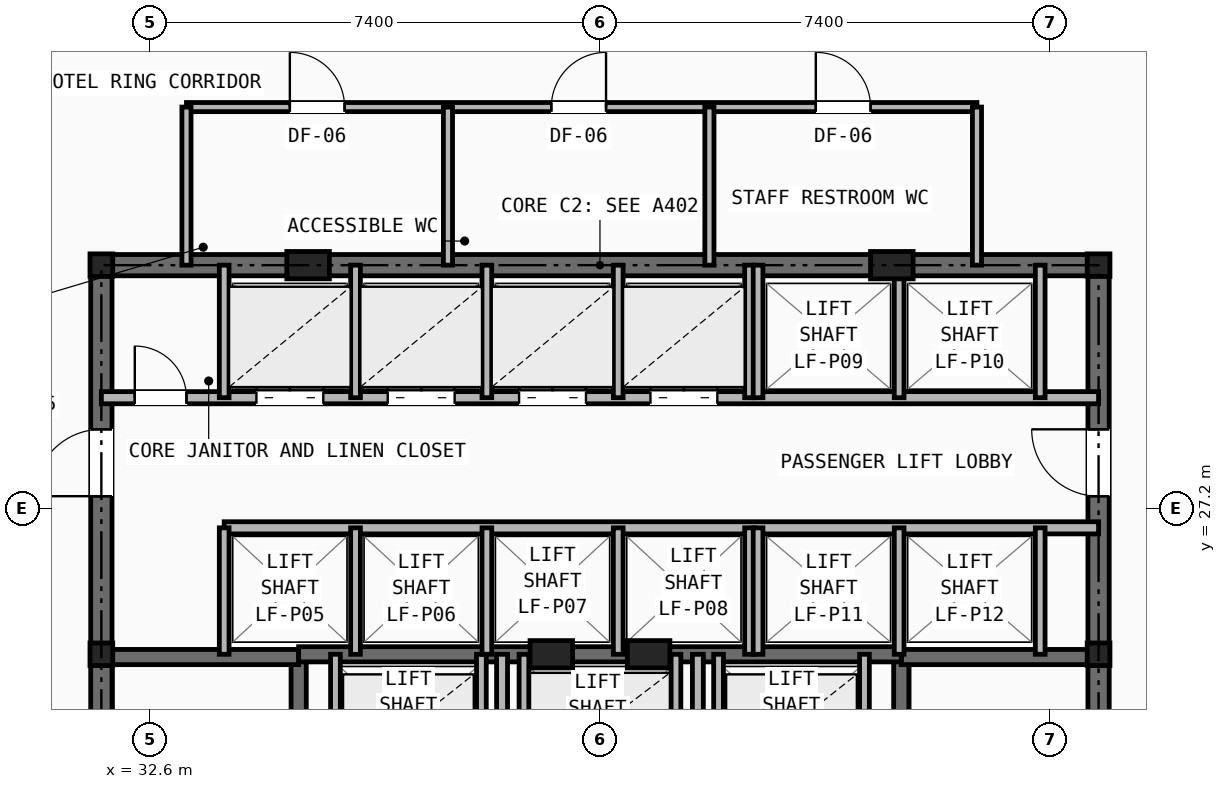
"""IFC4 building model, lengths in metres.
Left out: names, types, materials, properties, quantities, classifications, styles, units other than length and angle.
Written with IfcOpenShell. Run it as: python <this file> out.ifc"""

import sys

from ifc_helpers import new_model, si_unit, direction, frame, frame_2d, origin, origin_2d, place, context, subcontext, project, spatial, rectangle, i_section, extrude, element, fill, save


model = new_model("IFC4")
c1 = context("Model", 3, precision=1e-05, world=origin(), true_north=direction((0.0, 1.0)))
c2 = subcontext(c1, "Body", "Model", "MODEL_VIEW")
j1 = project(units=[si_unit("LENGTHUNIT", "METRE"), si_unit("PLANEANGLEUNIT", "RADIAN")], contexts=[c1])
p1 = place(None, origin())
s1 = spatial("IfcSite", under=j1, at=p1, CompositionType="ELEMENT")
p2 = place(p1, origin())
s2 = spatial("IfcBuilding", under=s1, at=p2, CompositionType="ELEMENT")
p3 = place(p2, frame((0.0, 0.0, 33.6)))
s3 = spatial("IfcBuildingStorey", under=s2, at=p3, CompositionType="ELEMENT", Elevation=33.6)
for number, where, z_axis, x_axis in (
    (1, (31.8, 24.8, 0.0), (0.0, 0.0, 1.0), (1.0, 0.0, 0.0)),
    (2, (48.2, 24.8, 0.0), (0.0, 0.0, 1.0), (1.0, 0.0, 0.0)),
    (3, (31.8, 31.2, 0.0), (0.0, 0.0, 1.0), (1.0, 0.0, 0.0)),
    (4, (48.2, 31.2, 0.0), (0.0, 0.0, 1.0), (1.0, 0.0, 0.0)),
):
    element("IfcColumn", number, at=place(p3, frame(where, z_axis=z_axis, x_axis=x_axis)), inside=s3, PredefinedType="COLUMN", context=c2, shape_type="SweptSolid", body=[
        extrude(i_section(OverallWidth=0.374, OverallDepth=0.372, WebThickness=0.016, FlangeThickness=0.026, at=origin_2d()), origin(), (0.0, 0.0, 1.0), 3.2),
    ])
for number, where, z_axis, x_axis in (
    (5, (35.2, 31.2, 0.0), (0.0, 0.0, 1.0), (1.0, 0.0, 0.0)),
    (6, (44.8, 31.2, 0.0), (0.0, 0.0, 1.0), (1.0, 0.0, 0.0)),
    (7, (39.2, 24.8, 0.0), (0.0, 0.0, 1.0), (1.0, 0.0, 0.0)),
    (8, (40.8, 24.8, 0.0), (0.0, 0.0, 1.0), (1.0, 0.0, 0.0)),
):
    element("IfcColumn", number, at=place(p3, frame(where, z_axis=z_axis, x_axis=x_axis)), inside=s3, PredefinedType="PILASTER", context=c2, shape_type="SweptSolid", body=[
        extrude(rectangle(XDim=0.7, YDim=0.45, at=origin_2d()), origin(), (0.0, 0.0, 1.0), 3.2),
    ])
p4 = place(p3, frame((31.8, 31.2, 0.0), z_axis=(0.0, 0.0, 1.0), x_axis=(1.0, 0.0, 0.0)))
e9 = element("IfcWall", 9, at=p4, inside=s3, PredefinedType="SHEAR", context=c2, shape_type="SweptSolid", body=[
    extrude(rectangle(XDim=16.4, YDim=0.35, at=frame_2d((8.2, 0.0))), origin(), (0.0, 0.0, 1.0), 2.98),
])
p5 = place(p3, frame((31.8, 16.4, 0.0), z_axis=(0.0, 0.0, 1.0), x_axis=(0.0, 1.0, 0.0)))
e10 = element("IfcWall", 10, at=p5, inside=s3, PredefinedType="SHEAR", context=c2, shape_type="SweptSolid", body=[
    extrude(rectangle(XDim=14.8, YDim=0.35, at=frame_2d((7.4, 0.0))), origin(), (0.0, 0.0, 1.0), 2.98),
])
p6 = place(p5, frame((11.0, 0.0, 0.0)))
e11 = element("IfcOpeningElement", 11, at=p6, cuts=e10, PredefinedType="OPENING", context=c2, shape_type="SweptSolid", body=[
    extrude(rectangle(XDim=1.1, YDim=2.15, at=frame_2d((0.55, 1.075))), frame((0.0, 0.185, 0.0), z_axis=(0.0, -1.0, 0.0), x_axis=(1.0, 0.0, 0.0)), (0.0, 0.0, 1.0), 0.37),
])
p7 = place(p3, frame((48.2, 16.4, 0.0), z_axis=(0.0, 0.0, 1.0), x_axis=(0.0, 1.0, 0.0)))
e12 = element("IfcWall", 12, at=p7, inside=s3, PredefinedType="SHEAR", context=c2, shape_type="SweptSolid", body=[
    extrude(rectangle(XDim=14.8, YDim=0.35, at=frame_2d((7.4, 0.0))), origin(), (0.0, 0.0, 1.0), 2.98),
])
p8 = place(p7, frame((11.0, 0.0, 0.0)))
e13 = element("IfcOpeningElement", 13, at=p8, cuts=e12, PredefinedType="OPENING", context=c2, shape_type="SweptSolid", body=[
    extrude(rectangle(XDim=1.1, YDim=2.15, at=frame_2d((0.55, 1.075))), frame((0.0, 0.185, 0.0), z_axis=(0.0, -1.0, 0.0), x_axis=(1.0, 0.0, 0.0)), (0.0, 0.0, 1.0), 0.37),
])
p9 = place(p3, frame((35.045, 16.4, 0.0), z_axis=(0.0, 0.0, 1.0), x_axis=(0.0, 1.0, 0.0)))
e14 = element("IfcWall", 14, at=p9, inside=s3, PredefinedType="SHEAR", context=c2, shape_type="SweptSolid", body=[
    extrude(rectangle(XDim=8.4, YDim=0.25, at=frame_2d((4.2, 0.0))), origin(), (0.0, 0.0, 1.0), 2.98),
])
p10 = place(p9, frame((0.45, 0.0, 0.0)))
e15 = element("IfcOpeningElement", 15, at=p10, cuts=e14, PredefinedType="OPENING", context=c2, shape_type="SweptSolid", body=[
    extrude(rectangle(XDim=0.95, YDim=2.1, at=frame_2d((0.475, 1.05))), frame((0.0, 0.135, 0.0), z_axis=(0.0, -1.0, 0.0), x_axis=(1.0, 0.0, 0.0)), (0.0, 0.0, 1.0), 0.27),
])
p11 = place(p3, frame((31.8, 24.755, 0.0), z_axis=(0.0, 0.0, 1.0), x_axis=(1.0, 0.0, 0.0)))
e16 = element("IfcWall", 16, at=p11, inside=s3, PredefinedType="SHEAR", context=c2, shape_type="SweptSolid", body=[
    extrude(rectangle(XDim=3.245, YDim=0.25, at=frame_2d((1.623, 0.0))), origin(), (0.0, 0.0, 1.0), 2.98),
])
p12 = place(p3, frame((44.955, 16.4, 0.0), z_axis=(0.0, 0.0, 1.0), x_axis=(0.0, 1.0, 0.0)))
e17 = element("IfcWall", 17, at=p12, inside=s3, PredefinedType="SHEAR", context=c2, shape_type="SweptSolid", body=[
    extrude(rectangle(XDim=8.4, YDim=0.25, at=frame_2d((4.2, 0.0))), origin(), (0.0, 0.0, 1.0), 2.98),
])
p13 = place(p12, frame((0.45, 0.0, 0.0)))
e18 = element("IfcOpeningElement", 18, at=p13, cuts=e17, PredefinedType="OPENING", context=c2, shape_type="SweptSolid", body=[
    extrude(rectangle(XDim=0.95, YDim=2.1, at=frame_2d((0.475, 1.05))), frame((0.0, 0.135, 0.0), z_axis=(0.0, -1.0, 0.0), x_axis=(1.0, 0.0, 0.0)), (0.0, 0.0, 1.0), 0.27),
])
p14 = place(p3, frame((44.955, 24.755, 0.0), z_axis=(0.0, 0.0, 1.0), x_axis=(1.0, 0.0, 0.0)))
e19 = element("IfcWall", 19, at=p14, inside=s3, PredefinedType="SHEAR", context=c2, shape_type="SweptSolid", body=[
    extrude(rectangle(XDim=3.245, YDim=0.25, at=frame_2d((1.623, 0.0))), origin(), (0.0, 0.0, 1.0), 2.98),
])
p15 = place(p3, frame((35.045, 24.8, 0.0), z_axis=(0.0, 0.0, 1.0), x_axis=(1.0, 0.0, 0.0)))
e20 = element("IfcWall", 20, at=p15, inside=s3, PredefinedType="SHEAR", context=c2, shape_type="SweptSolid", body=[
    extrude(rectangle(XDim=9.91, YDim=0.25, at=frame_2d((4.955, 0.0))), origin(), (0.0, 0.0, 1.0), 2.98),
])
p16 = place(p3, frame((38.39, 16.4, 0.0), z_axis=(0.0, 0.0, 1.0), x_axis=(0.0, 1.0, 0.0)))
e21 = element("IfcWall", 21, at=p16, inside=s3, PredefinedType="PARTITIONING", context=c2, shape_type="SweptSolid", body=[
    extrude(rectangle(XDim=8.4, YDim=0.18, at=frame_2d((4.2, 0.0))), origin(), (0.0, 0.0, 1.0), 2.431),
])
p17 = place(p16, frame((3.8, 0.0, 0.0)))
e22 = element("IfcOpeningElement", 22, at=p17, cuts=e21, PredefinedType="OPENING", context=c2, shape_type="SweptSolid", body=[
    extrude(rectangle(XDim=0.95, YDim=2.1, at=frame_2d((0.475, 1.05))), frame((0.0, 0.1, 0.0), z_axis=(0.0, -1.0, 0.0), x_axis=(1.0, 0.0, 0.0)), (0.0, 0.0, 1.0), 0.2),
])
p18 = place(p3, frame((41.61, 16.4, 0.0), z_axis=(0.0, 0.0, 1.0), x_axis=(0.0, 1.0, 0.0)))
e23 = element("IfcWall", 23, at=p18, inside=s3, PredefinedType="PARTITIONING", context=c2, shape_type="SweptSolid", body=[
    extrude(rectangle(XDim=8.4, YDim=0.18, at=frame_2d((4.2, 0.0))), origin(), (0.0, 0.0, 1.0), 2.431),
])
for number, where, z_axis, x_axis in (
    (24, (35.65, 22.48, 0.0), (0.0, 0.0, 1.0), (0.0, 1.0, 0.0)),
    (25, (38.05, 22.48, 0.0), (0.0, 0.0, 1.0), (0.0, 1.0, 0.0)),
    (26, (41.95, 22.48, 0.0), (0.0, 0.0, 1.0), (0.0, 1.0, 0.0)),
    (27, (44.35, 22.48, 0.0), (0.0, 0.0, 1.0), (0.0, 1.0, 0.0)),
    (28, (38.75, 22.48, 0.0), (0.0, 0.0, 1.0), (0.0, 1.0, 0.0)),
    (29, (41.25, 22.48, 0.0), (0.0, 0.0, 1.0), (0.0, 1.0, 0.0)),
):
    element("IfcWall", number, at=place(p3, frame(where, z_axis=z_axis, x_axis=x_axis)), inside=s3, PredefinedType="SOLIDWALL", context=c2, shape_type="SweptSolid", body=[
        extrude(rectangle(XDim=2.32, YDim=0.16, at=frame_2d((1.16, 0.0))), origin(), (0.0, 0.0, 1.0), 2.98),
    ])
p19 = place(p3, frame((31.8, 29.02, 0.0), z_axis=(0.0, 0.0, 1.0), x_axis=(1.0, 0.0, 0.0)))
e30 = element("IfcWall", 30, at=p19, inside=s3, PredefinedType="SOLIDWALL", context=c2, shape_type="SweptSolid", body=[
    extrude(rectangle(XDim=16.4, YDim=0.2, at=frame_2d((8.2, 0.0))), origin(), (0.0, 0.0, 1.0), 2.431),
])
p20 = place(p19, frame((0.55, 0.0, 0.0)))
e31 = element("IfcOpeningElement", 31, at=p20, cuts=e30, PredefinedType="OPENING", context=c2, shape_type="SweptSolid", body=[
    extrude(rectangle(XDim=0.85, YDim=2.05, at=frame_2d((0.425, 1.025))), frame((0.0, 0.11, 0.0), z_axis=(0.0, -1.0, 0.0), x_axis=(1.0, 0.0, 0.0)), (0.0, 0.0, 1.0), 0.22),
])
p21 = place(p19, frame((2.55, 0.0, 0.0)))
e32 = element("IfcOpeningElement", 32, at=p21, cuts=e30, PredefinedType="OPENING", context=c2, shape_type="SweptSolid", body=[
    extrude(rectangle(XDim=1.1, YDim=2.15, at=frame_2d((0.55, 1.075))), frame((0.0, 0.11, 0.0), z_axis=(0.0, -1.0, 0.0), x_axis=(1.0, 0.0, 0.0)), (0.0, 0.0, 1.0), 0.22),
])
p22 = place(p19, frame((4.71, 0.0, 0.0)))
e33 = element("IfcOpeningElement", 33, at=p22, cuts=e30, PredefinedType="OPENING", context=c2, shape_type="SweptSolid", body=[
    extrude(rectangle(XDim=1.1, YDim=2.15, at=frame_2d((0.55, 1.075))), frame((0.0, 0.11, 0.0), z_axis=(0.0, -1.0, 0.0), x_axis=(1.0, 0.0, 0.0)), (0.0, 0.0, 1.0), 0.22),
])
p23 = place(p19, frame((6.87, 0.0, 0.0)))
e34 = element("IfcOpeningElement", 34, at=p23, cuts=e30, PredefinedType="OPENING", context=c2, shape_type="SweptSolid", body=[
    extrude(rectangle(XDim=1.1, YDim=2.15, at=frame_2d((0.55, 1.075))), frame((0.0, 0.11, 0.0), z_axis=(0.0, -1.0, 0.0), x_axis=(1.0, 0.0, 0.0)), (0.0, 0.0, 1.0), 0.22),
])
p24 = place(p19, frame((9.03, 0.0, 0.0)))
e35 = element("IfcOpeningElement", 35, at=p24, cuts=e30, PredefinedType="OPENING", context=c2, shape_type="SweptSolid", body=[
    extrude(rectangle(XDim=1.1, YDim=2.15, at=frame_2d((0.55, 1.075))), frame((0.0, 0.11, 0.0), z_axis=(0.0, -1.0, 0.0), x_axis=(1.0, 0.0, 0.0)), (0.0, 0.0, 1.0), 0.22),
])
p25 = place(p3, frame((33.82, 26.88, 0.0), z_axis=(0.0, 0.0, 1.0), x_axis=(1.0, 0.0, 0.0)))
e36 = element("IfcWall", 36, at=p25, inside=s3, PredefinedType="SOLIDWALL", context=c2, shape_type="SweptSolid", body=[
    extrude(rectangle(XDim=14.38, YDim=0.2, at=frame_2d((7.19, 0.0))), origin(), (0.0, 0.0, 1.0), 2.431),
])
p26 = place(p3, frame((33.82, 29.02, 0.0), z_axis=(0.0, 0.0, 1.0), x_axis=(0.0, 1.0, 0.0)))
e37 = element("IfcWall", 37, at=p26, inside=s3, PredefinedType="SOLIDWALL", context=c2, shape_type="SweptSolid", body=[
    extrude(rectangle(XDim=2.18, YDim=0.16, at=frame_2d((1.09, 0.0))), origin(), (0.0, 0.0, 1.0), 2.431),
])
p27 = place(p3, frame((33.82, 24.8, 0.0), z_axis=(0.0, 0.0, 1.0), x_axis=(0.0, 1.0, 0.0)))
e38 = element("IfcWall", 38, at=p27, inside=s3, PredefinedType="SOLIDWALL", context=c2, shape_type="SweptSolid", body=[
    extrude(rectangle(XDim=2.08, YDim=0.16, at=frame_2d((1.04, 0.0))), origin(), (0.0, 0.0, 1.0), 2.98),
])
for number, where, z_axis, x_axis in (
    (39, (35.98, 29.02, 0.0), (0.0, 0.0, 1.0), (0.0, 1.0, 0.0)),
    (40, (38.14, 29.02, 0.0), (0.0, 0.0, 1.0), (0.0, 1.0, 0.0)),
    (41, (40.3, 29.02, 0.0), (0.0, 0.0, 1.0), (0.0, 1.0, 0.0)),
    (42, (42.46, 29.02, 0.0), (0.0, 0.0, 1.0), (0.0, 1.0, 0.0)),
):
    element("IfcWall", number, at=place(p3, frame(where, z_axis=z_axis, x_axis=x_axis)), inside=s3, PredefinedType="SOLIDWALL", context=c2, shape_type="SweptSolid", body=[
        extrude(rectangle(XDim=2.18, YDim=0.16, at=frame_2d((1.09, 0.0))), origin(), (0.0, 0.0, 1.0), 2.431),
    ])
for number, where, z_axis, x_axis in (
    (43, (35.98, 24.8, 0.0), (0.0, 0.0, 1.0), (0.0, 1.0, 0.0)),
    (44, (38.14, 24.8, 0.0), (0.0, 0.0, 1.0), (0.0, 1.0, 0.0)),
    (45, (40.3, 24.8, 0.0), (0.0, 0.0, 1.0), (0.0, 1.0, 0.0)),
    (46, (42.46, 24.8, 0.0), (0.0, 0.0, 1.0), (0.0, 1.0, 0.0)),
):
    element("IfcWall", number, at=place(p3, frame(where, z_axis=z_axis, x_axis=x_axis)), inside=s3, PredefinedType="SOLIDWALL", context=c2, shape_type="SweptSolid", body=[
        extrude(rectangle(XDim=2.08, YDim=0.16, at=frame_2d((1.04, 0.0))), origin(), (0.0, 0.0, 1.0), 2.98),
    ])
for number, where, z_axis, x_axis in (
    (47, (42.6, 29.02, 0.0), (0.0, 0.0, 1.0), (0.0, 1.0, 0.0)),
    (48, (44.92, 29.02, 0.0), (0.0, 0.0, 1.0), (0.0, 1.0, 0.0)),
    (49, (47.24, 29.02, 0.0), (0.0, 0.0, 1.0), (0.0, 1.0, 0.0)),
):
    element("IfcWall", number, at=place(p3, frame(where, z_axis=z_axis, x_axis=x_axis)), inside=s3, PredefinedType="SOLIDWALL", context=c2, shape_type="SweptSolid", body=[
        extrude(rectangle(XDim=2.18, YDim=0.16, at=frame_2d((1.09, 0.0))), origin(), (0.0, 0.0, 1.0), 2.431),
    ])
for number, where, z_axis, x_axis in (
    (50, (42.6, 24.8, 0.0), (0.0, 0.0, 1.0), (0.0, 1.0, 0.0)),
    (51, (44.92, 24.8, 0.0), (0.0, 0.0, 1.0), (0.0, 1.0, 0.0)),
    (52, (47.24, 24.8, 0.0), (0.0, 0.0, 1.0), (0.0, 1.0, 0.0)),
):
    element("IfcWall", number, at=place(p3, frame(where, z_axis=z_axis, x_axis=x_axis)), inside=s3, PredefinedType="SOLIDWALL", context=c2, shape_type="SweptSolid", body=[
        extrude(rectangle(XDim=2.08, YDim=0.16, at=frame_2d((1.04, 0.0))), origin(), (0.0, 0.0, 1.0), 2.98),
    ])
p28 = place(p3, frame((33.2, 33.8, 0.0), z_axis=(0.0, 0.0, 1.0), x_axis=(1.0, 0.0, 0.0)))
e53 = element("IfcWall", 53, at=p28, inside=s3, PredefinedType="PARTITIONING", context=c2, shape_type="SweptSolid", body=[
    extrude(rectangle(XDim=13.0, YDim=0.15, at=frame_2d((6.5, 0.0))), origin(), (0.0, 0.0, 1.0), 2.98),
])
p29 = place(p28, frame((1.7, 0.0, 0.0)))
e54 = element("IfcOpeningElement", 54, at=p29, cuts=e53, PredefinedType="OPENING", context=c2, shape_type="SweptSolid", body=[
    extrude(rectangle(XDim=0.9, YDim=2.1, at=frame_2d((0.45, 1.05))), frame((0.0, 0.085, 0.0), z_axis=(0.0, -1.0, 0.0), x_axis=(1.0, 0.0, 0.0)), (0.0, 0.0, 1.0), 0.17),
])
p30 = place(p28, frame((6.0, 0.0, 0.0)))
e55 = element("IfcOpeningElement", 55, at=p30, cuts=e53, PredefinedType="OPENING", context=c2, shape_type="SweptSolid", body=[
    extrude(rectangle(XDim=0.9, YDim=2.1, at=frame_2d((0.45, 1.05))), frame((0.0, 0.085, 0.0), z_axis=(0.0, -1.0, 0.0), x_axis=(1.0, 0.0, 0.0)), (0.0, 0.0, 1.0), 0.17),
])
p31 = place(p28, frame((10.35, 0.0, 0.0)))
e56 = element("IfcOpeningElement", 56, at=p31, cuts=e53, PredefinedType="OPENING", context=c2, shape_type="SweptSolid", body=[
    extrude(rectangle(XDim=0.9, YDim=2.1, at=frame_2d((0.45, 1.05))), frame((0.0, 0.085, 0.0), z_axis=(0.0, -1.0, 0.0), x_axis=(1.0, 0.0, 0.0)), (0.0, 0.0, 1.0), 0.17),
])
for number, where, z_axis, x_axis in (
    (57, (33.2, 31.2, 0.0), (0.0, 0.0, 1.0), (0.0, 1.0, 0.0)),
    (58, (46.2, 31.2, 0.0), (0.0, 0.0, 1.0), (0.0, 1.0, 0.0)),
    (59, (37.5, 31.2, 0.0), (0.0, 0.0, 1.0), (0.0, 1.0, 0.0)),
    (60, (41.8, 31.2, 0.0), (0.0, 0.0, 1.0), (0.0, 1.0, 0.0)),
):
    element("IfcWall", number, at=place(p3, frame(where, z_axis=z_axis, x_axis=x_axis)), inside=s3, PredefinedType="PARTITIONING", context=c2, shape_type="SweptSolid", body=[
        extrude(rectangle(XDim=2.6, YDim=0.15, at=frame_2d((1.3, 0.0))), origin(), (0.0, 0.0, 1.0), 2.431),
    ])
p32 = place(p20, origin())
e61 = element("IfcDoor", 61, at=p32, inside=s3, OperationType="SINGLE_SWING_LEFT", PredefinedType="DOOR", context=c2, shape_type="SweptSolid", body=[
    extrude(rectangle(XDim=0.85, YDim=2.05, at=frame_2d((0.425, 1.025))), frame((0.0, 0.025, 0.0), z_axis=(0.0, -1.0, 0.0), x_axis=(1.0, 0.0, 0.0)), (0.0, 0.0, 1.0), 0.05),
])
fill(e31, e61)
p33 = place(p6, origin())
e62 = element("IfcDoor", 62, at=p33, inside=s3, OperationType="SINGLE_SWING_LEFT", PredefinedType="DOOR", context=c2, shape_type="SweptSolid", body=[
    extrude(rectangle(XDim=1.1, YDim=2.15, at=frame_2d((0.55, 1.075))), frame((0.0, 0.025, 0.0), z_axis=(0.0, -1.0, 0.0), x_axis=(1.0, 0.0, 0.0)), (0.0, 0.0, 1.0), 0.05),
])
fill(e11, e62)
p34 = place(p8, origin())
e63 = element("IfcDoor", 63, at=p34, inside=s3, OperationType="SINGLE_SWING_RIGHT", PredefinedType="DOOR", context=c2, shape_type="SweptSolid", body=[
    extrude(rectangle(XDim=1.1, YDim=2.15, at=frame_2d((0.55, 1.075))), frame((0.0, 0.025, 0.0), z_axis=(0.0, -1.0, 0.0), x_axis=(1.0, 0.0, 0.0)), (0.0, 0.0, 1.0), 0.05),
])
fill(e13, e63)
p35 = place(p21, origin())
e64 = element("IfcDoor", 64, at=p35, inside=s3, OperationType="DOUBLE_DOOR_SLIDING", PredefinedType="DOOR", context=c2, shape_type="SweptSolid", body=[
    extrude(rectangle(XDim=1.1, YDim=2.15, at=frame_2d((0.55, 1.075))), frame((0.0, 0.025, 0.0), z_axis=(0.0, -1.0, 0.0), x_axis=(1.0, 0.0, 0.0)), (0.0, 0.0, 1.0), 0.05),
])
fill(e32, e64)
p36 = place(p22, origin())
e65 = element("IfcDoor", 65, at=p36, inside=s3, OperationType="DOUBLE_DOOR_SLIDING", PredefinedType="DOOR", context=c2, shape_type="SweptSolid", body=[
    extrude(rectangle(XDim=1.1, YDim=2.15, at=frame_2d((0.55, 1.075))), frame((0.0, 0.025, 0.0), z_axis=(0.0, -1.0, 0.0), x_axis=(1.0, 0.0, 0.0)), (0.0, 0.0, 1.0), 0.05),
])
fill(e33, e65)
p37 = place(p23, origin())
e66 = element("IfcDoor", 66, at=p37, inside=s3, OperationType="DOUBLE_DOOR_SLIDING", PredefinedType="DOOR", context=c2, shape_type="SweptSolid", body=[
    extrude(rectangle(XDim=1.1, YDim=2.15, at=frame_2d((0.55, 1.075))), frame((0.0, 0.025, 0.0), z_axis=(0.0, -1.0, 0.0), x_axis=(1.0, 0.0, 0.0)), (0.0, 0.0, 1.0), 0.05),
])
fill(e34, e66)
p38 = place(p24, origin())
e67 = element("IfcDoor", 67, at=p38, inside=s3, OperationType="DOUBLE_DOOR_SLIDING", PredefinedType="DOOR", context=c2, shape_type="SweptSolid", body=[
    extrude(rectangle(XDim=1.1, YDim=2.15, at=frame_2d((0.55, 1.075))), frame((0.0, 0.025, 0.0), z_axis=(0.0, -1.0, 0.0), x_axis=(1.0, 0.0, 0.0)), (0.0, 0.0, 1.0), 0.05),
])
fill(e35, e67)
p39 = place(p29, origin())
e68 = element("IfcDoor", 68, at=p39, inside=s3, OperationType="SINGLE_SWING_LEFT", PredefinedType="DOOR", context=c2, shape_type="SweptSolid", body=[
    extrude(rectangle(XDim=0.9, YDim=2.1, at=frame_2d((0.45, 1.05))), frame((0.0, 0.025, 0.0), z_axis=(0.0, -1.0, 0.0), x_axis=(1.0, 0.0, 0.0)), (0.0, 0.0, 1.0), 0.05),
])
fill(e54, e68)
p40 = place(p30, origin())
e69 = element("IfcDoor", 69, at=p40, inside=s3, OperationType="SINGLE_SWING_RIGHT", PredefinedType="DOOR", context=c2, shape_type="SweptSolid", body=[
    extrude(rectangle(XDim=0.9, YDim=2.1, at=frame_2d((0.45, 1.05))), frame((0.0, 0.025, 0.0), z_axis=(0.0, -1.0, 0.0), x_axis=(1.0, 0.0, 0.0)), (0.0, 0.0, 1.0), 0.05),
])
fill(e55, e69)
p41 = place(p31, origin())
e70 = element("IfcDoor", 70, at=p41, inside=s3, OperationType="SINGLE_SWING_LEFT", PredefinedType="DOOR", context=c2, shape_type="SweptSolid", body=[
    extrude(rectangle(XDim=0.9, YDim=2.1, at=frame_2d((0.45, 1.05))), frame((0.0, 0.025, 0.0), z_axis=(0.0, -1.0, 0.0), x_axis=(1.0, 0.0, 0.0)), (0.0, 0.0, 1.0), 0.05),
])
fill(e56, e70)
save(model, sys.argv[1])
